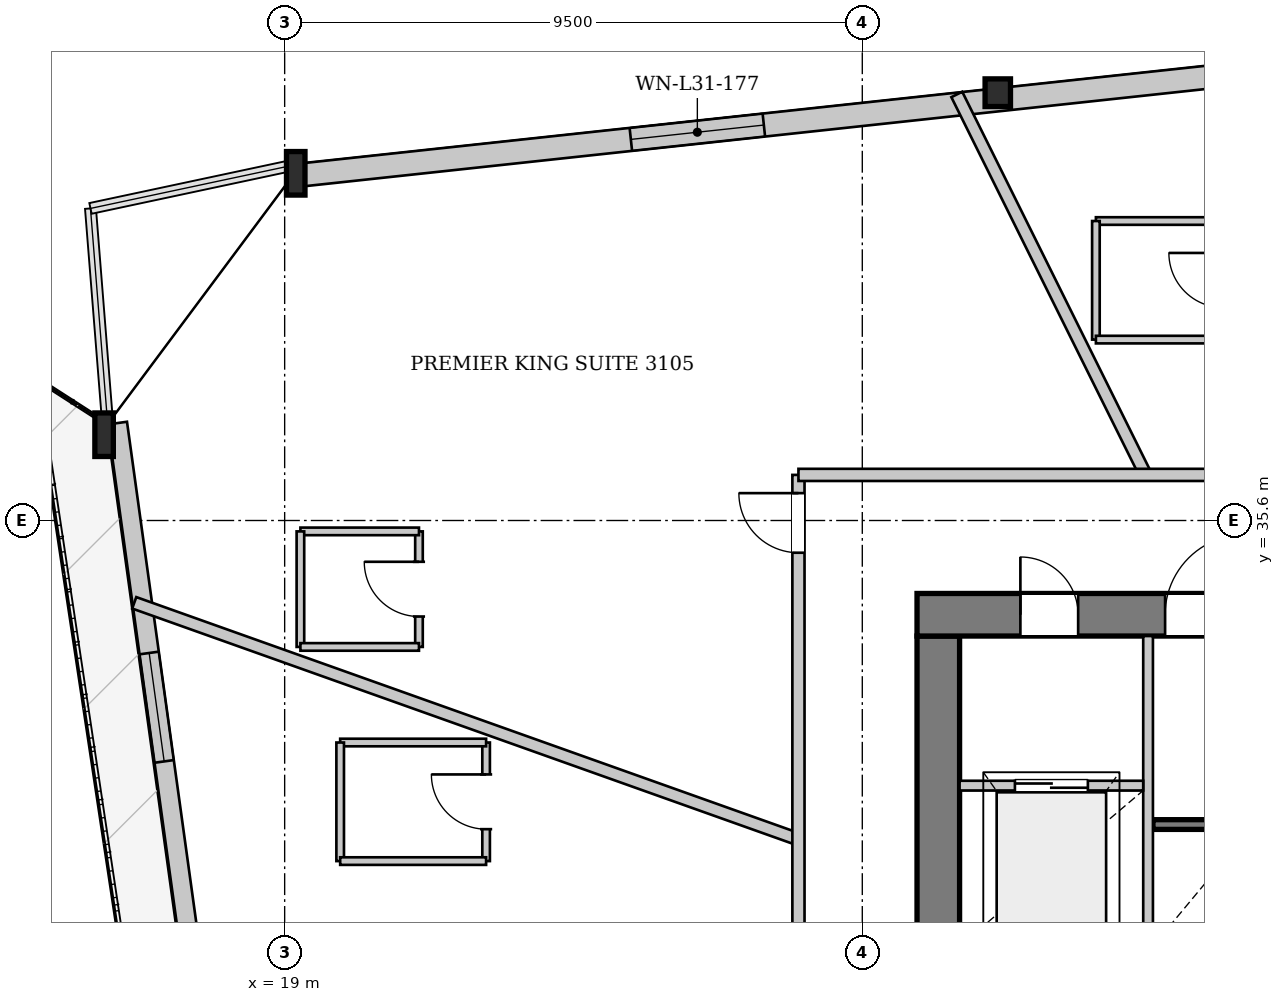
"""IFC4 building model, lengths in metres.
Left out: names, types, materials, properties, quantities, classifications, styles, units other than length and angle.
Written with IfcOpenShell. Run it as: python <this file> out.ifc"""

import sys

from ifc_helpers import new_model, si_unit, direction, frame, frame_2d, origin, origin_2d, place, context, subcontext, project, spatial, rectangle, i_section, extrude, source, transform, mapped, element, fill, save


model = new_model("IFC4")
c1 = context("Model", 3, precision=1e-05, world=origin(), true_north=direction((0.0, 1.0)))
c2 = subcontext(c1, "Body", "Model", "MODEL_VIEW")
j1 = project(units=[si_unit("LENGTHUNIT", "METRE"), si_unit("PLANEANGLEUNIT", "RADIAN")], contexts=[c1])
p1 = place(None, origin())
s1 = spatial("IfcSite", under=j1, at=p1, CompositionType="ELEMENT")
p2 = place(p1, origin())
s2 = spatial("IfcBuilding", under=s1, at=p2, CompositionType="ELEMENT")
p3 = place(p2, frame((0.0, 0.0, 119.9)))
s3 = spatial("IfcBuildingStorey", under=s2, at=p3, CompositionType="ELEMENT", Elevation=119.9)
m1 = source(origin(), c2, "Body", "SweptSolid", [
    extrude(i_section(OverallWidth=0.418, OverallDepth=0.455, WebThickness=0.038, FlangeThickness=0.059, at=origin_2d()), origin(), (0.0, 0.0, 1.0), 3.399),
])
p4 = place(p3, frame((30.854, 42.723, 0.0), z_axis=(-0.074056478472, -0.051573764833, 0.995919567424), x_axis=(0.571484182627, -0.820613081182, 0.0)))
e1 = element("IfcColumn", 1, at=p4, inside=s3, PredefinedType="COLUMN", context=c2, shape_type="MappedRepresentation", body=[
    mapped(m1, transform((0.0, 0.0, 0.0), x_axis=(1.0, 0.0, 0.0), y_axis=(0.0, 1.0, 0.0), z_axis=(0.0, 0.0, 1.0), scale=1.0)),
])
m2 = source(origin(), c2, "Body", "SweptSolid", [
    extrude(i_section(OverallWidth=0.304, OverallDepth=0.716, WebThickness=0.021, FlangeThickness=0.04, at=origin_2d()), origin(), (0.0, 0.0, 1.0), 3.408),
])
p5 = place(p3, frame((19.292, 41.476, 0.0), z_axis=(-0.064039664093, -0.09734888535, 0.993187855314), x_axis=(0.835439365716, -0.549582629103, 0.0)))
e2 = element("IfcColumn", 2, at=p5, inside=s3, PredefinedType="COLUMN", context=c2, shape_type="MappedRepresentation", body=[
    mapped(m2, transform((0.0, 0.0, 0.0), x_axis=(1.0, 0.0, 0.0), y_axis=(0.0, 1.0, 0.0), z_axis=(0.0, 0.0, 1.0), scale=1.0)),
])
m3 = source(origin(), c2, "Body", "SweptSolid", [
    extrude(i_section(OverallWidth=0.304, OverallDepth=0.716, WebThickness=0.021, FlangeThickness=0.04, at=origin_2d()), origin(), (0.0, 0.0, 1.0), 3.404),
])
p6 = place(p3, frame((16.09, 37.18, 0.0), z_axis=(-0.035071915278, -0.099478009184, 0.994421483299), x_axis=(0.94310325707, -0.332499994742, 0.0)))
e3 = element("IfcColumn", 3, at=p6, inside=s3, PredefinedType="COLUMN", context=c2, shape_type="MappedRepresentation", body=[
    mapped(m3, transform((0.0, 0.0, 0.0), x_axis=(1.0, 0.0, 0.0), y_axis=(0.0, 1.0, 0.0), z_axis=(0.0, 0.0, 1.0), scale=1.0)),
])
p7 = place(p3, frame((18.735, 19.232, 0.0), z_axis=(0.0, 0.0, 1.0), x_axis=(-0.137044979398, 0.990564825553, 0.0)))
e4 = element("IfcWall", 4, at=p7, inside=s3, PredefinedType="SOLIDWALL", context=c2, shape_type="SweptSolid", body=[
    extrude(rectangle(XDim=18.141, YDim=0.32, at=frame_2d((9.07, 0.0))), origin(), (0.0, 0.0, 1.0), 2.692),
])
p8 = place(p7, frame((5.255, 0.0, 0.0)))
e5 = element("IfcOpeningElement", 5, at=p8, cuts=e4, PredefinedType="OPENING", context=c2, shape_type="SweptSolid", body=[
    extrude(rectangle(XDim=1.1, YDim=2.3, at=frame_2d((0.55, 1.15))), frame((0.0, 0.17, 0.0), z_axis=(0.0, -1.0, 0.0), x_axis=(1.0, 0.0, 0.0)), (0.0, 0.0, 1.0), 0.34),
])
p9 = place(p7, frame((12.524, 0.0, 0.372)))
e6 = element("IfcOpeningElement", 6, at=p9, cuts=e4, PredefinedType="OPENING", context=c2, shape_type="SweptSolid", body=[
    extrude(rectangle(XDim=1.8, YDim=2.2, at=frame_2d((0.9, 1.1))), frame((0.0, 0.17, 0.0), z_axis=(0.0, -1.0, 0.0), x_axis=(1.0, 0.0, 0.0)), (0.0, 0.0, 1.0), 0.34),
])
p10 = place(p3, frame((19.312, 41.287, 0.0), z_axis=(0.0, 0.0, 1.0), x_axis=(0.994233058372, 0.107240969969, 0.0)))
e7 = element("IfcWall", 7, at=p10, inside=s3, PredefinedType="SOLIDWALL", context=c2, shape_type="SweptSolid", body=[
    extrude(rectangle(XDim=23.26, YDim=0.38, at=frame_2d((11.63, 0.0))), origin(), (0.0, 0.0, 1.0), 2.692),
])
p11 = place(p10, frame((5.413, 0.0, 0.322)))
e8 = element("IfcOpeningElement", 8, at=p11, cuts=e7, PredefinedType="OPENING", context=c2, shape_type="SweptSolid", body=[
    extrude(rectangle(XDim=2.2, YDim=2.25, at=frame_2d((1.1, 1.125))), frame((0.0, 0.2, 0.0), z_axis=(0.0, -1.0, 0.0), x_axis=(1.0, 0.0, 0.0)), (0.0, 0.0, 1.0), 0.4),
])
p12 = place(p10, frame((15.647, 0.0, 0.322)))
e9 = element("IfcOpeningElement", 9, at=p12, cuts=e7, PredefinedType="OPENING", context=c2, shape_type="SweptSolid", body=[
    extrude(rectangle(XDim=2.2, YDim=2.25, at=frame_2d((1.1, 1.125))), frame((0.0, 0.2, 0.0), z_axis=(0.0, -1.0, 0.0), x_axis=(1.0, 0.0, 0.0)), (0.0, 0.0, 1.0), 0.4),
])
p13 = place(p3, frame((29.75, 19.5, 0.0), z_axis=(0.0, 0.0, 1.0), x_axis=(0.0, 1.0, 0.0)))
e10 = element("IfcWall", 10, at=p13, inside=s3, PredefinedType="SHEAR", context=c2, shape_type="SweptSolid", body=[
    extrude(rectangle(XDim=14.2, YDim=0.7, at=frame_2d((7.1, 0.0))), origin(), (0.0, 0.0, 1.0), 3.3),
])
p14 = place(p13, frame((7.42, 0.0, 0.0)))
e11 = element("IfcOpeningElement", 11, at=p14, cuts=e10, PredefinedType="OPENING", context=c2, shape_type="SweptSolid", body=[
    extrude(rectangle(XDim=1.6, YDim=2.2, at=frame_2d((0.8, 1.1))), frame((0.0, 0.36, 0.0), z_axis=(0.0, -1.0, 0.0), x_axis=(1.0, 0.0, 0.0)), (0.0, 0.0, 1.0), 0.72),
])
p15 = place(p3, frame((29.4, 34.05, 0.0), z_axis=(0.0, 0.0, 1.0), x_axis=(1.0, 0.0, 0.0)))
e12 = element("IfcWall", 12, at=p15, inside=s3, PredefinedType="SHEAR", context=c2, shape_type="SweptSolid", body=[
    extrude(rectangle(XDim=17.2, YDim=0.7, at=frame_2d((8.6, 0.0))), origin(), (0.0, 0.0, 1.0), 3.3),
])
p16 = place(p15, frame((1.7, 0.0, 0.0)))
e13 = element("IfcOpeningElement", 13, at=p16, cuts=e12, PredefinedType="OPENING", context=c2, shape_type="SweptSolid", body=[
    extrude(rectangle(XDim=0.95, YDim=2.1, at=frame_2d((0.475, 1.05))), frame((0.0, 0.36, 0.0), z_axis=(0.0, -1.0, 0.0), x_axis=(1.0, 0.0, 0.0)), (0.0, 0.0, 1.0), 0.72),
])
p17 = place(p15, frame((4.08, 0.0, 0.0)))
e14 = element("IfcOpeningElement", 14, at=p17, cuts=e12, PredefinedType="OPENING", context=c2, shape_type="SweptSolid", body=[
    extrude(rectangle(XDim=1.32, YDim=2.2, at=frame_2d((0.66, 1.1))), frame((0.0, 0.36, 0.0), z_axis=(0.0, -1.0, 0.0), x_axis=(1.0, 0.0, 0.0)), (0.0, 0.0, 1.0), 0.72),
])
p18 = place(p15, frame((15.15, 0.0, 0.0)))
e15 = element("IfcOpeningElement", 15, at=p18, cuts=e12, PredefinedType="OPENING", context=c2, shape_type="SweptSolid", body=[
    extrude(rectangle(XDim=0.95, YDim=2.1, at=frame_2d((0.475, 1.05))), frame((0.0, 0.36, 0.0), z_axis=(0.0, -1.0, 0.0), x_axis=(1.0, 0.0, 0.0)), (0.0, 0.0, 1.0), 0.72),
])
p19 = place(p3, frame((33.28, 30.6, 0.0), z_axis=(0.0, 0.0, 1.0), x_axis=(1.0, 0.0, 0.0)))
e16 = element("IfcWall", 16, at=p19, inside=s3, PredefinedType="PARTITIONING", context=c2, shape_type="SweptSolid", body=[
    extrude(rectangle(XDim=7.3, YDim=0.16, at=frame_2d((3.65, 0.0))), origin(), (0.0, 0.0, 1.0), 3.3),
])
p20 = place(p3, frame((33.2, 28.44, 0.0), z_axis=(0.0, 0.0, 1.0), x_axis=(0.0, 1.0, 0.0)))
e17 = element("IfcWall", 17, at=p20, inside=s3, PredefinedType="PARTITIONING", context=c2, shape_type="SweptSolid", body=[
    extrude(rectangle(XDim=5.26, YDim=0.16, at=frame_2d((2.63, 0.0))), origin(), (0.0, 0.0, 1.0), 3.3),
])
p21 = place(p3, frame((30.1, 31.24, 0.0), z_axis=(0.0, 0.0, 1.0), x_axis=(1.0, 0.0, 0.0)))
e18 = element("IfcWall", 18, at=p21, inside=s3, PredefinedType="PARTITIONING", context=c2, shape_type="SweptSolid", body=[
    extrude(rectangle(XDim=3.02, YDim=0.16, at=frame_2d((1.51, 0.0))), origin(), (0.0, 0.0, 1.0), 3.3),
])
p22 = place(p21, frame((0.91, 0.0, 0.0)))
e19 = element("IfcOpeningElement", 19, at=p22, cuts=e18, PredefinedType="OPENING", context=c2, shape_type="SweptSolid", body=[
    extrude(rectangle(XDim=1.2, YDim=2.2, at=frame_2d((0.6, 1.1))), frame((0.0, 0.09, 0.0), z_axis=(0.0, -1.0, 0.0), x_axis=(1.0, 0.0, 0.0)), (0.0, 0.0, 1.0), 0.18),
])
p23 = place(p3, frame((33.16, 36.35, 0.0), z_axis=(0.0, 0.0, 1.0), x_axis=(-0.444639192868, 0.895709767819, 0.0)))
e20 = element("IfcWall", 20, at=p23, inside=s3, PredefinedType="PARTITIONING", context=c2, shape_type="SweptSolid", body=[
    extrude(rectangle(XDim=6.985, YDim=0.2, at=frame_2d((3.492, 0.0))), origin(), (0.0, 0.0, 1.0), 3.3),
])
p24 = place(p3, frame((27.45, 30.357, 0.0), z_axis=(0.0, 0.0, 1.0), x_axis=(-0.942054935906, 0.335458637891, 0.0)))
e21 = element("IfcWall", 21, at=p24, inside=s3, PredefinedType="PARTITIONING", context=c2, shape_type="SweptSolid", body=[
    extrude(rectangle(XDim=11.596, YDim=0.2, at=frame_2d((5.798, 0.0))), origin(), (0.0, 0.0, 1.0), 3.3),
])
p25 = place(p3, frame((34.442, 40.525, 0.0), z_axis=(0.0, 0.0, 1.0), x_axis=(-1.0, 0.0, 0.0)))
e22 = element("IfcWall", 22, at=p25, inside=s3, PredefinedType="PARTITIONING", context=c2, shape_type="SweptSolid", body=[
    extrude(rectangle(XDim=2.1, YDim=0.125, at=frame_2d((1.05, 0.0))), origin(), (0.0, 0.0, 1.0), 3.3),
])
p26 = place(p3, frame((32.342, 40.525, 0.0), z_axis=(0.0, 0.0, 1.0), x_axis=(0.0, -1.0, 0.0)))
e23 = element("IfcWall", 23, at=p26, inside=s3, PredefinedType="PARTITIONING", context=c2, shape_type="SweptSolid", body=[
    extrude(rectangle(XDim=1.95, YDim=0.125, at=frame_2d((0.975, 0.0))), origin(), (0.0, 0.0, 1.0), 3.3),
])
p27 = place(p3, frame((32.342, 38.575, 0.0), z_axis=(0.0, 0.0, 1.0), x_axis=(1.0, 0.0, 0.0)))
e24 = element("IfcWall", 24, at=p27, inside=s3, PredefinedType="PARTITIONING", context=c2, shape_type="SweptSolid", body=[
    extrude(rectangle(XDim=2.1, YDim=0.125, at=frame_2d((1.05, 0.0))), origin(), (0.0, 0.0, 1.0), 3.3),
])
p28 = place(p3, frame((21.209, 33.521, 0.0), z_axis=(0.0, 0.0, 1.0), x_axis=(0.0, 1.0, 0.0)))
e25 = element("IfcWall", 25, at=p28, inside=s3, PredefinedType="PARTITIONING", context=c2, shape_type="SweptSolid", body=[
    extrude(rectangle(XDim=1.9, YDim=0.125, at=frame_2d((0.95, 0.0))), origin(), (0.0, 0.0, 1.0), 3.3),
])
p29 = place(p28, frame((0.5, 0.0, 0.0)))
e26 = element("IfcOpeningElement", 26, at=p29, cuts=e25, PredefinedType="OPENING", context=c2, shape_type="SweptSolid", body=[
    extrude(rectangle(XDim=0.9, YDim=2.1, at=frame_2d((0.45, 1.05))), frame((0.0, 0.073, 0.0), z_axis=(0.0, -1.0, 0.0), x_axis=(1.0, 0.0, 0.0)), (0.0, 0.0, 1.0), 0.145),
])
p30 = place(p3, frame((21.209, 35.421, 0.0), z_axis=(0.0, 0.0, 1.0), x_axis=(-1.0, 0.0, 0.0)))
e27 = element("IfcWall", 27, at=p30, inside=s3, PredefinedType="PARTITIONING", context=c2, shape_type="SweptSolid", body=[
    extrude(rectangle(XDim=1.95, YDim=0.125, at=frame_2d((0.975, 0.0))), origin(), (0.0, 0.0, 1.0), 2.975),
])
p31 = place(p3, frame((19.259, 35.421, 0.0), z_axis=(0.0, 0.0, 1.0), x_axis=(0.0, -1.0, 0.0)))
e28 = element("IfcWall", 28, at=p31, inside=s3, PredefinedType="PARTITIONING", context=c2, shape_type="SweptSolid", body=[
    extrude(rectangle(XDim=1.9, YDim=0.125, at=frame_2d((0.95, 0.0))), origin(), (0.0, 0.0, 1.0), 3.3),
])
p32 = place(p3, frame((19.259, 33.521, 0.0), z_axis=(0.0, 0.0, 1.0), x_axis=(1.0, 0.0, 0.0)))
e29 = element("IfcWall", 29, at=p32, inside=s3, PredefinedType="PARTITIONING", context=c2, shape_type="SweptSolid", body=[
    extrude(rectangle(XDim=1.95, YDim=0.125, at=frame_2d((0.975, 0.0))), origin(), (0.0, 0.0, 1.0), 3.3),
])
p33 = place(p3, frame((22.313, 29.999, 0.0), z_axis=(0.0, 0.0, 1.0), x_axis=(0.0, 1.0, 0.0)))
e30 = element("IfcWall", 30, at=p33, inside=s3, PredefinedType="PARTITIONING", context=c2, shape_type="SweptSolid", body=[
    extrude(rectangle(XDim=1.95, YDim=0.125, at=frame_2d((0.975, 0.0))), origin(), (0.0, 0.0, 1.0), 3.045),
])
p34 = place(p33, frame((0.525, 0.0, 0.0)))
e31 = element("IfcOpeningElement", 31, at=p34, cuts=e30, PredefinedType="OPENING", context=c2, shape_type="SweptSolid", body=[
    extrude(rectangle(XDim=0.9, YDim=2.1, at=frame_2d((0.45, 1.05))), frame((0.0, 0.073, 0.0), z_axis=(0.0, -1.0, 0.0), x_axis=(1.0, 0.0, 0.0)), (0.0, 0.0, 1.0), 0.145),
])
p35 = place(p3, frame((22.313, 31.949, 0.0), z_axis=(0.0, 0.0, 1.0), x_axis=(-1.0, 0.0, 0.0)))
e32 = element("IfcWall", 32, at=p35, inside=s3, PredefinedType="PARTITIONING", context=c2, shape_type="SweptSolid", body=[
    extrude(rectangle(XDim=2.4, YDim=0.125, at=frame_2d((1.2, 0.0))), origin(), (0.0, 0.0, 1.0), 3.3),
])
p36 = place(p3, frame((19.913, 31.949, 0.0), z_axis=(0.0, 0.0, 1.0), x_axis=(0.0, -1.0, 0.0)))
e33 = element("IfcWall", 33, at=p36, inside=s3, PredefinedType="PARTITIONING", context=c2, shape_type="SweptSolid", body=[
    extrude(rectangle(XDim=1.95, YDim=0.125, at=frame_2d((0.975, 0.0))), origin(), (0.0, 0.0, 1.0), 3.3),
])
p37 = place(p3, frame((19.913, 29.999, 0.0), z_axis=(0.0, 0.0, 1.0), x_axis=(1.0, 0.0, 0.0)))
e34 = element("IfcWall", 34, at=p37, inside=s3, PredefinedType="PARTITIONING", context=c2, shape_type="SweptSolid", body=[
    extrude(rectangle(XDim=2.4, YDim=0.125, at=frame_2d((1.2, 0.0))), origin(), (0.0, 0.0, 1.0), 3.3),
])
p38 = place(p3, frame((27.45, 16.85, 0.0), z_axis=(0.0, 0.0, 1.0), x_axis=(0.0, 1.0, 0.0)))
e35 = element("IfcWall", 35, at=p38, inside=s3, PredefinedType="PARTITIONING", context=c2, shape_type="SweptSolid", body=[
    extrude(rectangle(XDim=19.5, YDim=0.2, at=frame_2d((9.75, 0.0))), origin(), (0.0, 0.0, 1.0), 3.3),
])
p39 = place(p38, frame((18.22, 0.0, 0.0)))
e36 = element("IfcOpeningElement", 36, at=p39, cuts=e35, PredefinedType="OPENING", context=c2, shape_type="SweptSolid", body=[
    extrude(rectangle(XDim=0.98, YDim=2.15, at=frame_2d((0.49, 1.075))), frame((0.0, 0.11, 0.0), z_axis=(0.0, -1.0, 0.0), x_axis=(1.0, 0.0, 0.0)), (0.0, 0.0, 1.0), 0.22),
])
p40 = place(p38, frame((8.504, 0.0, 0.0)))
e37 = element("IfcOpeningElement", 37, at=p40, cuts=e35, PredefinedType="OPENING", context=c2, shape_type="SweptSolid", body=[
    extrude(rectangle(XDim=0.98, YDim=2.15, at=frame_2d((0.49, 1.075))), frame((0.0, 0.11, 0.0), z_axis=(0.0, -1.0, 0.0), x_axis=(1.0, 0.0, 0.0)), (0.0, 0.0, 1.0), 0.22),
])
p41 = place(p3, frame((27.45, 36.35, 0.0), z_axis=(0.0, 0.0, 1.0), x_axis=(1.0, 0.0, 0.0)))
e38 = element("IfcWall", 38, at=p41, inside=s3, PredefinedType="PARTITIONING", context=c2, shape_type="SweptSolid", body=[
    extrude(rectangle(XDim=21.1, YDim=0.2, at=frame_2d((10.55, 0.0))), origin(), (0.0, 0.0, 1.0), 3.3),
])
p42 = place(p41, frame((19.579, 0.0, 0.0)))
e39 = element("IfcOpeningElement", 39, at=p42, cuts=e38, PredefinedType="OPENING", context=c2, shape_type="SweptSolid", body=[
    extrude(rectangle(XDim=0.98, YDim=2.15, at=frame_2d((0.49, 1.075))), frame((0.0, 0.11, 0.0), z_axis=(0.0, -1.0, 0.0), x_axis=(1.0, 0.0, 0.0)), (0.0, 0.0, 1.0), 0.22),
])
p43 = place(p41, frame((10.375, 0.0, 0.0)))
e40 = element("IfcOpeningElement", 40, at=p43, cuts=e38, PredefinedType="OPENING", context=c2, shape_type="SweptSolid", body=[
    extrude(rectangle(XDim=0.98, YDim=2.15, at=frame_2d((0.49, 1.075))), frame((0.0, 0.11, 0.0), z_axis=(0.0, -1.0, 0.0), x_axis=(1.0, 0.0, 0.0)), (0.0, 0.0, 1.0), 0.22),
])
m4 = source(origin(), c2, "Body", "SweptSolid", [
    extrude(rectangle(XDim=1.8, YDim=2.2, at=frame_2d((0.9, 1.1))), frame((0.0, 0.03, 0.0), z_axis=(0.0, -1.0, 0.0), x_axis=(1.0, 0.0, 0.0)), (0.0, 0.0, 1.0), 0.06),
])
p44 = place(p9, origin())
e41 = element("IfcWindow", 41, at=p44, inside=s3, PartitioningType="SINGLE_PANEL", PredefinedType="WINDOW", context=c2, shape_type="MappedRepresentation", body=[
    mapped(m4, transform((0.0, 0.0, 0.0), x_axis=(1.0, 0.0, 0.0), y_axis=(0.0, 1.0, 0.0), z_axis=(0.0, 0.0, 1.0), scale=1.0)),
])
fill(e6, e41)
m5 = source(origin(), c2, "Body", "SweptSolid", [
    extrude(rectangle(XDim=2.2, YDim=2.25, at=frame_2d((1.1, 1.125))), frame((0.0, 0.03, 0.0), z_axis=(0.0, -1.0, 0.0), x_axis=(1.0, 0.0, 0.0)), (0.0, 0.0, 1.0), 0.06),
])
p45 = place(p11, origin())
e42 = element("IfcWindow", 42, at=p45, inside=s3, PartitioningType="SINGLE_PANEL", PredefinedType="WINDOW", context=c2, shape_type="MappedRepresentation", body=[
    mapped(m5, transform((0.0, 0.0, 0.0), x_axis=(1.0, 0.0, 0.0), y_axis=(0.0, 1.0, 0.0), z_axis=(0.0, 0.0, 1.0), scale=1.0)),
])
fill(e8, e42)
m6 = source(origin(), c2, "Body", "SweptSolid", [
    extrude(rectangle(XDim=0.95, YDim=2.1, at=frame_2d((0.475, 1.05))), frame((0.0, 0.025, 0.0), z_axis=(0.0, -1.0, 0.0), x_axis=(1.0, 0.0, 0.0)), (0.0, 0.0, 1.0), 0.05),
])
p46 = place(p16, origin())
e43 = element("IfcDoor", 43, at=p46, inside=s3, OperationType="SINGLE_SWING_LEFT", PredefinedType="DOOR", context=c2, shape_type="MappedRepresentation", body=[
    mapped(m6, transform((0.0, 0.0, 0.0), x_axis=(1.0, 0.0, 0.0), y_axis=(0.0, 1.0, 0.0), z_axis=(0.0, 0.0, 1.0), scale=1.0)),
])
fill(e13, e43)
m7 = source(origin(), c2, "Body", "SweptSolid", [
    extrude(rectangle(XDim=1.32, YDim=2.2, at=frame_2d((0.66, 1.1))), frame((0.0, 0.025, 0.0), z_axis=(0.0, -1.0, 0.0), x_axis=(1.0, 0.0, 0.0)), (0.0, 0.0, 1.0), 0.05),
])
p47 = place(p17, origin())
e44 = element("IfcDoor", 44, at=p47, inside=s3, OperationType="SINGLE_SWING_RIGHT", PredefinedType="DOOR", context=c2, shape_type="MappedRepresentation", body=[
    mapped(m7, transform((0.0, 0.0, 0.0), x_axis=(1.0, 0.0, 0.0), y_axis=(0.0, 1.0, 0.0), z_axis=(0.0, 0.0, 1.0), scale=1.0)),
])
fill(e14, e44)
m8 = source(origin(), c2, "Body", "SweptSolid", [
    extrude(rectangle(XDim=1.2, YDim=2.2, at=frame_2d((0.6, 1.1))), frame((0.0, 0.025, 0.0), z_axis=(0.0, -1.0, 0.0), x_axis=(1.0, 0.0, 0.0)), (0.0, 0.0, 1.0), 0.05),
])
p48 = place(p22, origin())
e45 = element("IfcDoor", 45, at=p48, inside=s3, OperationType="DOUBLE_DOOR_SLIDING", PredefinedType="DOOR", context=c2, shape_type="MappedRepresentation", body=[
    mapped(m8, transform((0.0, 0.0, 0.0), x_axis=(1.0, 0.0, 0.0), y_axis=(0.0, 1.0, 0.0), z_axis=(0.0, 0.0, 1.0), scale=1.0)),
])
fill(e19, e45)
m9 = source(origin(), c2, "Body", "SweptSolid", [
    extrude(rectangle(XDim=0.9, YDim=2.1, at=frame_2d((0.45, 1.05))), frame((0.0, 0.025, 0.0), z_axis=(0.0, -1.0, 0.0), x_axis=(1.0, 0.0, 0.0)), (0.0, 0.0, 1.0), 0.05),
])
p49 = place(p29, origin())
e46 = element("IfcDoor", 46, at=p49, inside=s3, OperationType="SINGLE_SWING_RIGHT", PredefinedType="DOOR", context=c2, shape_type="MappedRepresentation", body=[
    mapped(m9, transform((0.0, 0.0, 0.0), x_axis=(1.0, 0.0, 0.0), y_axis=(0.0, 1.0, 0.0), z_axis=(0.0, 0.0, 1.0), scale=1.0)),
])
fill(e26, e46)
p50 = place(p34, origin())
e47 = element("IfcDoor", 47, at=p50, inside=s3, OperationType="SINGLE_SWING_RIGHT", PredefinedType="DOOR", context=c2, shape_type="MappedRepresentation", body=[
    mapped(m9, transform((0.0, 0.0, 0.0), x_axis=(1.0, 0.0, 0.0), y_axis=(0.0, 1.0, 0.0), z_axis=(0.0, 0.0, 1.0), scale=1.0)),
])
fill(e31, e47)
m10 = source(origin(), c2, "Body", "SweptSolid", [
    extrude(rectangle(XDim=0.98, YDim=2.15, at=frame_2d((0.49, 1.075))), frame((0.0, 0.025, 0.0), z_axis=(0.0, -1.0, 0.0), x_axis=(1.0, 0.0, 0.0)), (0.0, 0.0, 1.0), 0.05),
])
p51 = place(p39, origin())
e48 = element("IfcDoor", 48, at=p51, inside=s3, OperationType="SINGLE_SWING_RIGHT", PredefinedType="DOOR", context=c2, shape_type="MappedRepresentation", body=[
    mapped(m10, transform((0.0, 0.0, 0.0), x_axis=(1.0, 0.0, 0.0), y_axis=(0.0, 1.0, 0.0), z_axis=(0.0, 0.0, 1.0), scale=1.0)),
])
fill(e36, e48)
save(model, sys.argv[1])
